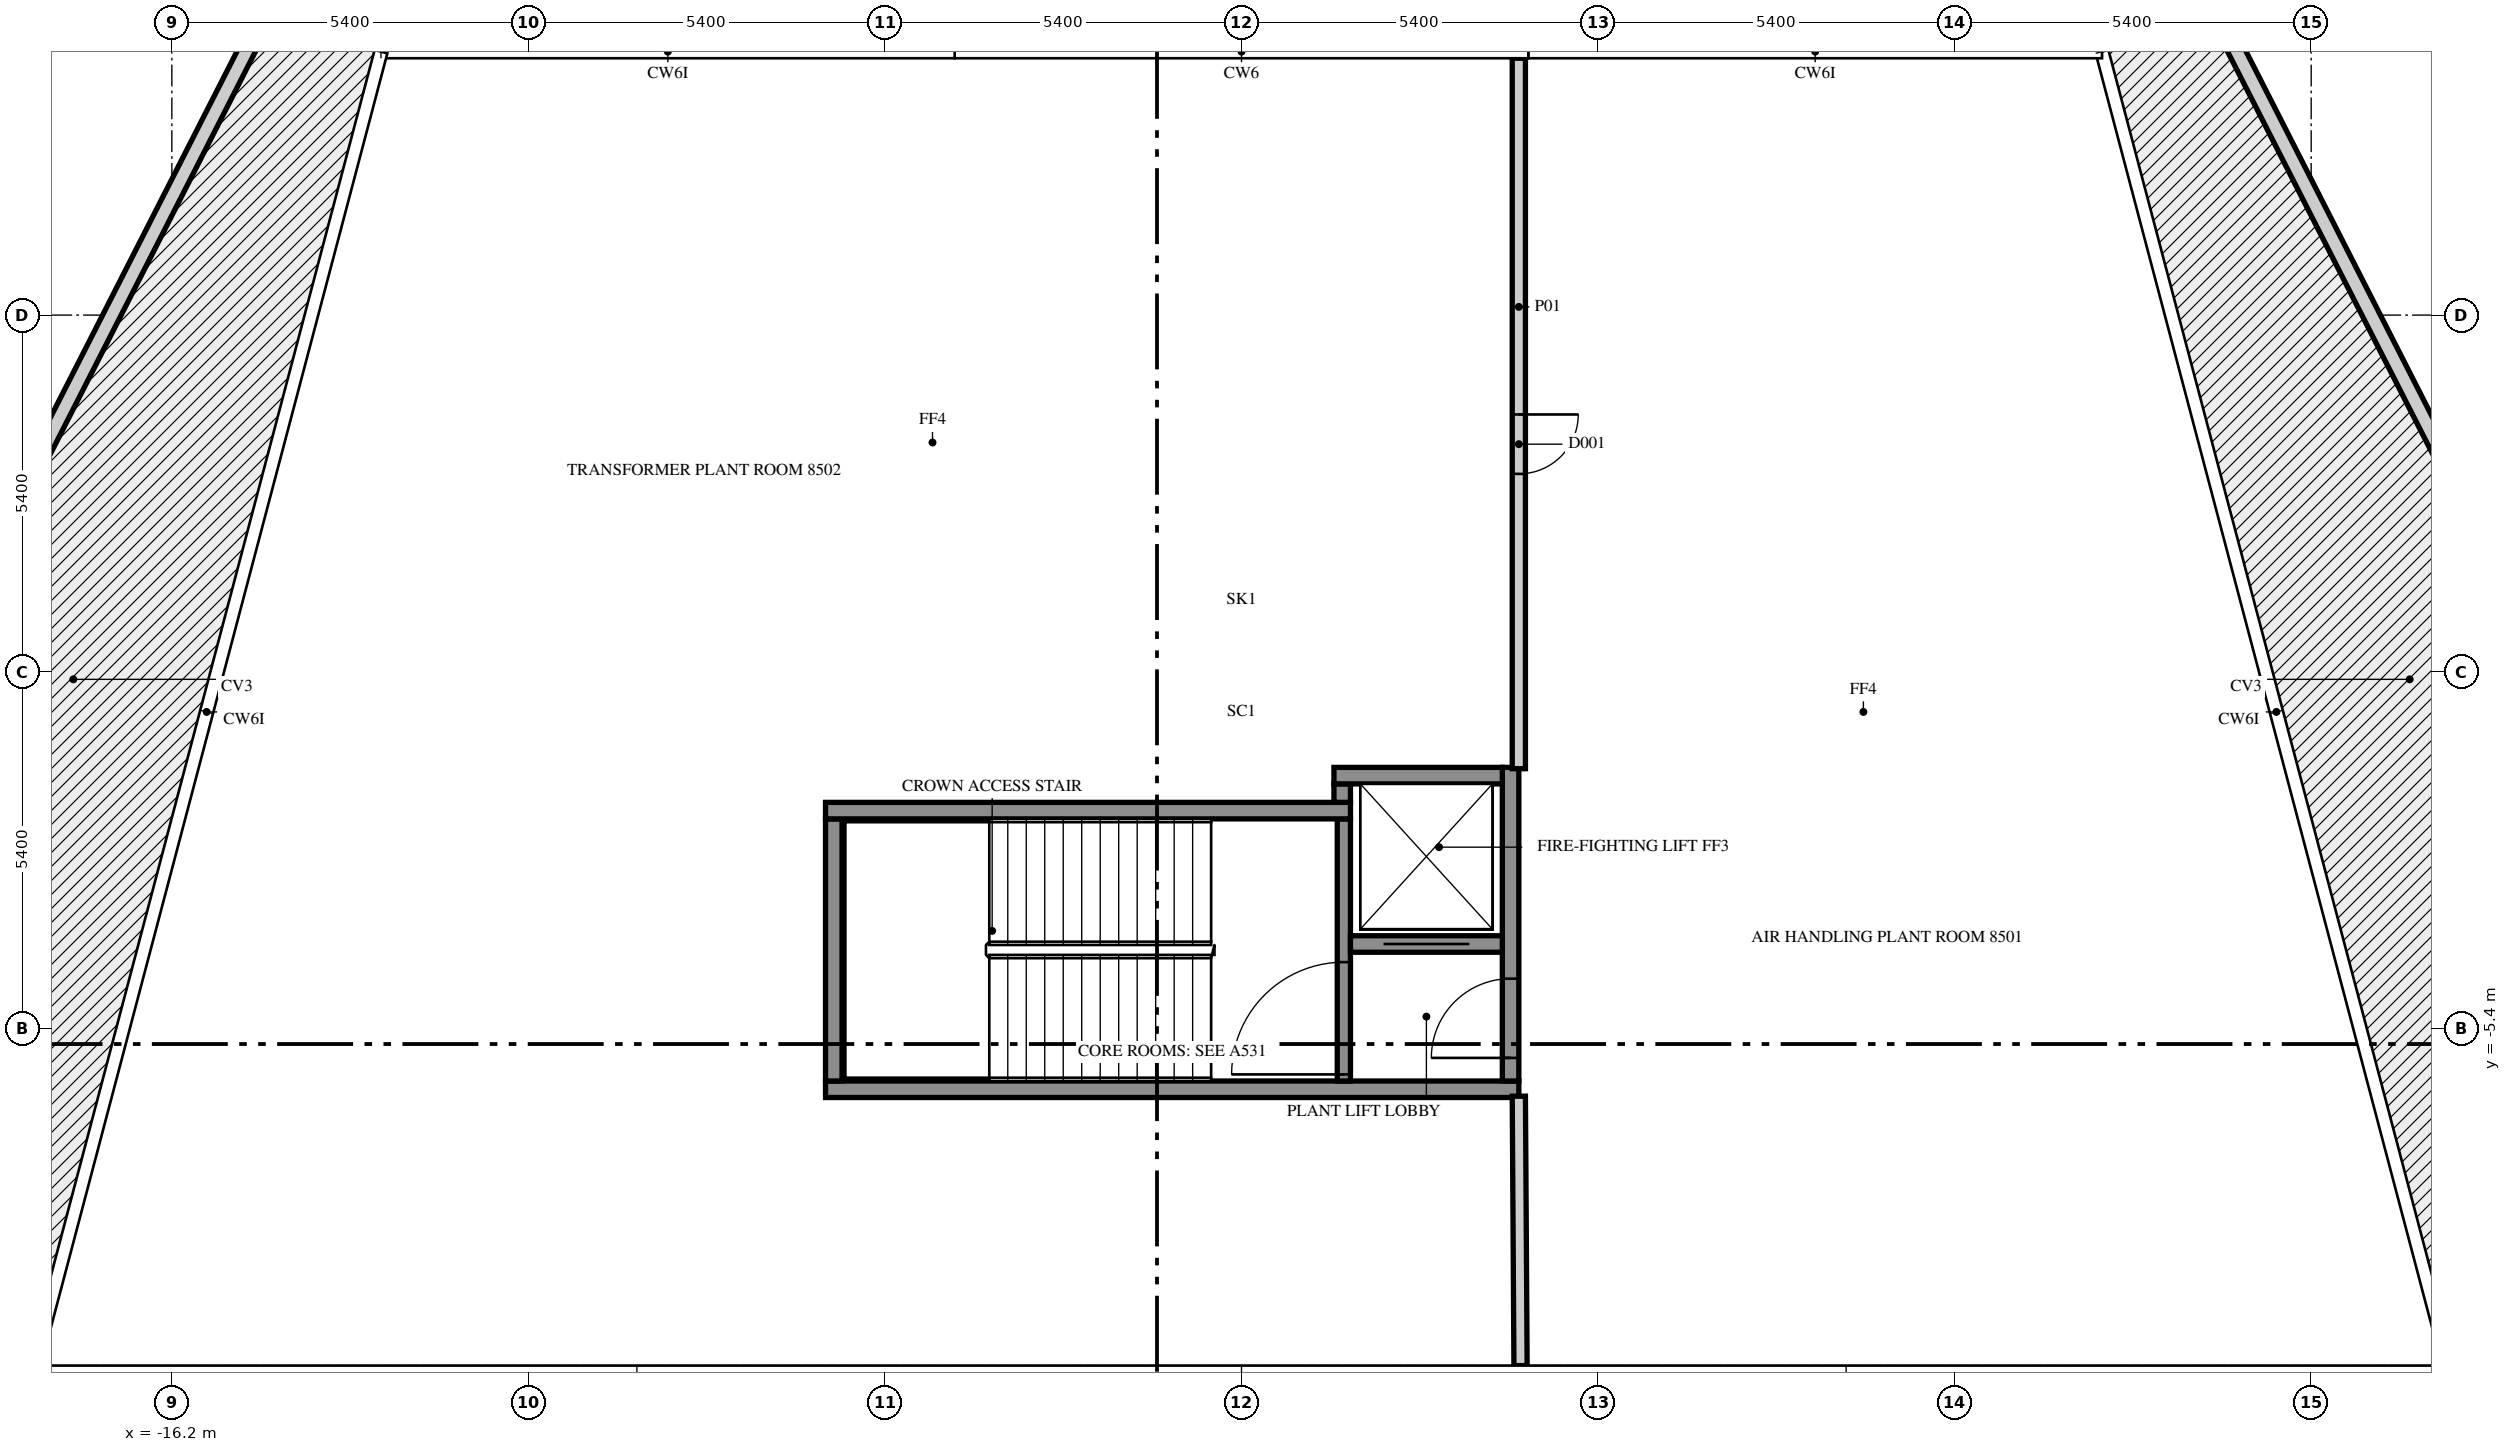
"""IFC4 building model, lengths in metres.
Left out: names, types, materials, properties, quantities, classifications, styles, units other than length and angle.
Written with IfcOpenShell. Run it as: python <this file> out.ifc"""

import sys

from ifc_helpers import new_model, si_unit, direction, frame, frame_2d, origin, place, context, subcontext, project, spatial, rectangle, extrude, element, fill, save


model = new_model("IFC4")
c1 = context("Model", 3, precision=1e-05, world=origin(), true_north=direction((0.0, 1.0)))
c2 = subcontext(c1, "Body", "Model", "MODEL_VIEW")
j1 = project(units=[si_unit("LENGTHUNIT", "METRE"), si_unit("PLANEANGLEUNIT", "RADIAN")], contexts=[c1])
p1 = place(None, origin())
s1 = spatial("IfcSite", under=j1, at=p1, CompositionType="ELEMENT")
p2 = place(p1, origin())
s2 = spatial("IfcBuilding", under=s1, at=p2, CompositionType="ELEMENT")
p3 = place(p2, frame((0.0, 0.0, 368.0)))
s3 = spatial("IfcBuildingStorey", under=s2, at=p3, CompositionType="ELEMENT", Elevation=368.0)
p4 = place(p3, frame((14.319, 10.875, 0.0), z_axis=(0.0, 0.0, 1.0), x_axis=(0.453994623596, -0.891004422966, 0.0)))
e1 = element("IfcWall", 1, at=p4, inside=s3, PredefinedType="PARAPET", context=c2, shape_type="SweptSolid", body=[
    extrude(rectangle(XDim=21.834, YDim=0.25, at=frame_2d((10.917, 0.0))), origin(), (0.0, 0.0, 1.0), 1.1),
])
p5 = place(p3, frame((-24.288, -8.691, 0.0), z_axis=(0.0, 0.0, 1.0), x_axis=(0.453985746595, 0.891008946021, 0.0)))
e2 = element("IfcWall", 2, at=p5, inside=s3, PredefinedType="PARAPET", context=c2, shape_type="SweptSolid", body=[
    extrude(rectangle(XDim=21.834, YDim=0.25, at=frame_2d((10.917, 0.0))), origin(), (0.0, 0.0, 1.0), 1.1),
])
p6 = place(p3, frame((-6.3, -6.325, 0.0), z_axis=(0.0, 0.0, 1.0), x_axis=(1.0, 0.0, 0.0)))
e3 = element("IfcWall", 3, at=p6, inside=s3, PredefinedType="SHEAR", context=c2, shape_type="SweptSolid", body=[
    extrude(rectangle(XDim=10.5, YDim=0.25, at=frame_2d((5.25, 0.0))), origin(), (0.0, 0.0, 1.0), 3.75),
])
p7 = place(p3, frame((-6.175, -6.2, 0.0), z_axis=(0.0, 0.0, 1.0), x_axis=(0.0, 1.0, 0.0)))
e4 = element("IfcWall", 4, at=p7, inside=s3, PredefinedType="SHEAR", context=c2, shape_type="SweptSolid", body=[
    extrude(rectangle(XDim=3.97, YDim=0.25, at=frame_2d((1.985, 0.0))), origin(), (0.0, 0.0, 1.0), 3.75),
])
p8 = place(p3, frame((1.55, -6.2, 0.0), z_axis=(0.0, 0.0, 1.0), x_axis=(0.0, 1.0, 0.0)))
e5 = element("IfcWall", 5, at=p8, inside=s3, PredefinedType="SHEAR", context=c2, shape_type="SweptSolid", body=[
    extrude(rectangle(XDim=3.97, YDim=0.2, at=frame_2d((1.985, 0.0))), origin(), (0.0, 0.0, 1.0), 3.75),
])
p9 = place(p8, frame((0.1, 0.0, 0.0)))
e6 = element("IfcOpeningElement", 6, at=p9, cuts=e5, PredefinedType="OPENING", context=c2, shape_type="SweptSolid", body=[
    extrude(rectangle(XDim=1.7, YDim=2.1, at=frame_2d((0.85, 1.05))), frame((0.0, 0.11, 0.0), z_axis=(0.0, -1.0, 0.0), x_axis=(1.0, 0.0, 0.0)), (0.0, 0.0, 1.0), 0.22),
])
p10 = place(p3, frame((4.075, -6.2, 0.0), z_axis=(0.0, 0.0, 1.0), x_axis=(0.0, 1.0, 0.0)))
e7 = element("IfcWall", 7, at=p10, inside=s3, PredefinedType="SHEAR", context=c2, shape_type="SweptSolid", body=[
    extrude(rectangle(XDim=4.75, YDim=0.25, at=frame_2d((2.375, 0.0))), origin(), (0.0, 0.0, 1.0), 3.75),
])
p11 = place(p10, frame((0.35, 0.0, 0.0)))
e8 = element("IfcOpeningElement", 8, at=p11, cuts=e7, PredefinedType="OPENING", context=c2, shape_type="SweptSolid", body=[
    extrude(rectangle(XDim=1.2, YDim=2.1, at=frame_2d((0.6, 1.05))), frame((0.0, 0.135, 0.0), z_axis=(0.0, -1.0, 0.0), x_axis=(1.0, 0.0, 0.0)), (0.0, 0.0, 1.0), 0.27),
])
p12 = place(p3, frame((1.65, -4.125, 0.0), z_axis=(0.0, 0.0, 1.0), x_axis=(1.0, 0.0, 0.0)))
e9 = element("IfcWall", 9, at=p12, inside=s3, PredefinedType="SHEAR", context=c2, shape_type="SweptSolid", body=[
    extrude(rectangle(XDim=2.3, YDim=0.25, at=frame_2d((1.15, 0.0))), origin(), (0.0, 0.0, 1.0), 3.75),
])
p13 = place(p12, frame((0.5, 0.0, 0.0)))
e10 = element("IfcOpeningElement", 10, at=p13, cuts=e9, PredefinedType="OPENING", context=c2, shape_type="SweptSolid", body=[
    extrude(rectangle(XDim=1.3, YDim=2.1, at=frame_2d((0.65, 1.05))), frame((0.0, 0.135, 0.0), z_axis=(0.0, -1.0, 0.0), x_axis=(1.0, 0.0, 0.0)), (0.0, 0.0, 1.0), 0.27),
])
p14 = place(p3, frame((-6.3, -2.105, 0.0), z_axis=(0.0, 0.0, 1.0), x_axis=(1.0, 0.0, 0.0)))
e11 = element("IfcWall", 11, at=p14, inside=s3, PredefinedType="SHEAR", context=c2, shape_type="SweptSolid", body=[
    extrude(rectangle(XDim=7.95, YDim=0.25, at=frame_2d((3.975, 0.0))), origin(), (0.0, 0.0, 1.0), 3.75),
])
p15 = place(p3, frame((1.525, -1.98, 0.0), z_axis=(0.0, 0.0, 1.0), x_axis=(0.0, 1.0, 0.0)))
e12 = element("IfcWall", 12, at=p15, inside=s3, PredefinedType="SHEAR", context=c2, shape_type="SweptSolid", body=[
    extrude(rectangle(XDim=0.28, YDim=0.25, at=frame_2d((0.14, 0.0))), origin(), (0.0, 0.0, 1.0), 3.75),
])
p16 = place(p3, frame((1.4, -1.575, 0.0), z_axis=(0.0, 0.0, 1.0), x_axis=(1.0, 0.0, 0.0)))
e13 = element("IfcWall", 13, at=p16, inside=s3, PredefinedType="SHEAR", context=c2, shape_type="SweptSolid", body=[
    extrude(rectangle(XDim=2.55, YDim=0.25, at=frame_2d((1.275, 0.0))), origin(), (0.0, 0.0, 1.0), 3.75),
])
p17 = place(p3, frame((4.2, 9.29, 0.0), z_axis=(0.0, 0.0, 1.0), x_axis=(0.0, -1.0, 0.0)))
e14 = element("IfcWall", 14, at=p17, inside=s3, PredefinedType="SOLIDWALL", context=c2, shape_type="SweptSolid", body=[
    extrude(rectangle(XDim=10.76, YDim=0.2, at=frame_2d((5.38, 0.0))), origin(), (0.0, 0.0, 1.0), 2.838),
])
p18 = place(p17, frame((5.395, 0.0, 0.0)))
e15 = element("IfcOpeningElement", 15, at=p18, cuts=e14, PredefinedType="OPENING", context=c2, shape_type="SweptSolid", body=[
    extrude(rectangle(XDim=0.9, YDim=2.1, at=frame_2d((0.45, 1.05))), frame((0.0, 0.11, 0.0), z_axis=(0.0, -1.0, 0.0), x_axis=(1.0, 0.0, 0.0)), (0.0, 0.0, 1.0), 0.22),
])
p19 = place(p3, frame((4.2, -6.43, 0.0), z_axis=(0.0, 0.0, 1.0), x_axis=(0.006282786478, -0.999980263102, 0.0)))
e16 = element("IfcWall", 16, at=p19, inside=s3, PredefinedType="SOLIDWALL", context=c2, shape_type="SweptSolid", body=[
    extrude(rectangle(XDim=4.08, YDim=0.2, at=frame_2d((2.04, 0.0))), origin(), (0.0, 0.0, 1.0), 2.25),
])
p20 = place(p9, origin())
e17 = element("IfcDoor", 17, at=p20, inside=s3, OperationType="DOUBLE_DOOR_SINGLE_SWING", PredefinedType="DOOR", context=c2, shape_type="SweptSolid", body=[
    extrude(rectangle(XDim=1.7, YDim=2.1, at=frame_2d((0.85, 1.05))), frame((0.0, 0.025, 0.0), z_axis=(0.0, -1.0, 0.0), x_axis=(1.0, 0.0, 0.0)), (0.0, 0.0, 1.0), 0.05),
])
fill(e6, e17)
p21 = place(p11, origin())
e18 = element("IfcDoor", 18, at=p21, inside=s3, OperationType="SINGLE_SWING_LEFT", PredefinedType="DOOR", context=c2, shape_type="SweptSolid", body=[
    extrude(rectangle(XDim=1.2, YDim=2.1, at=frame_2d((0.6, 1.05))), frame((0.0, 0.025, 0.0), z_axis=(0.0, -1.0, 0.0), x_axis=(1.0, 0.0, 0.0)), (0.0, 0.0, 1.0), 0.05),
])
fill(e8, e18)
p22 = place(p13, origin())
e19 = element("IfcDoor", 19, at=p22, inside=s3, OperationType="DOUBLE_DOOR_SLIDING", PredefinedType="DOOR", context=c2, shape_type="SweptSolid", body=[
    extrude(rectangle(XDim=1.3, YDim=2.1, at=frame_2d((0.65, 1.05))), frame((0.0, 0.025, 0.0), z_axis=(0.0, -1.0, 0.0), x_axis=(1.0, 0.0, 0.0)), (0.0, 0.0, 1.0), 0.05),
])
fill(e10, e19)
p23 = place(p18, origin())
e20 = element("IfcDoor", 20, at=p23, inside=s3, OperationType="SINGLE_SWING_LEFT", PredefinedType="DOOR", context=c2, shape_type="SweptSolid", body=[
    extrude(rectangle(XDim=0.9, YDim=2.1, at=frame_2d((0.45, 1.05))), frame((0.0, 0.025, 0.0), z_axis=(0.0, -1.0, 0.0), x_axis=(1.0, 0.0, 0.0)), (0.0, 0.0, 1.0), 0.05),
])
fill(e15, e20)
save(model, sys.argv[1])
